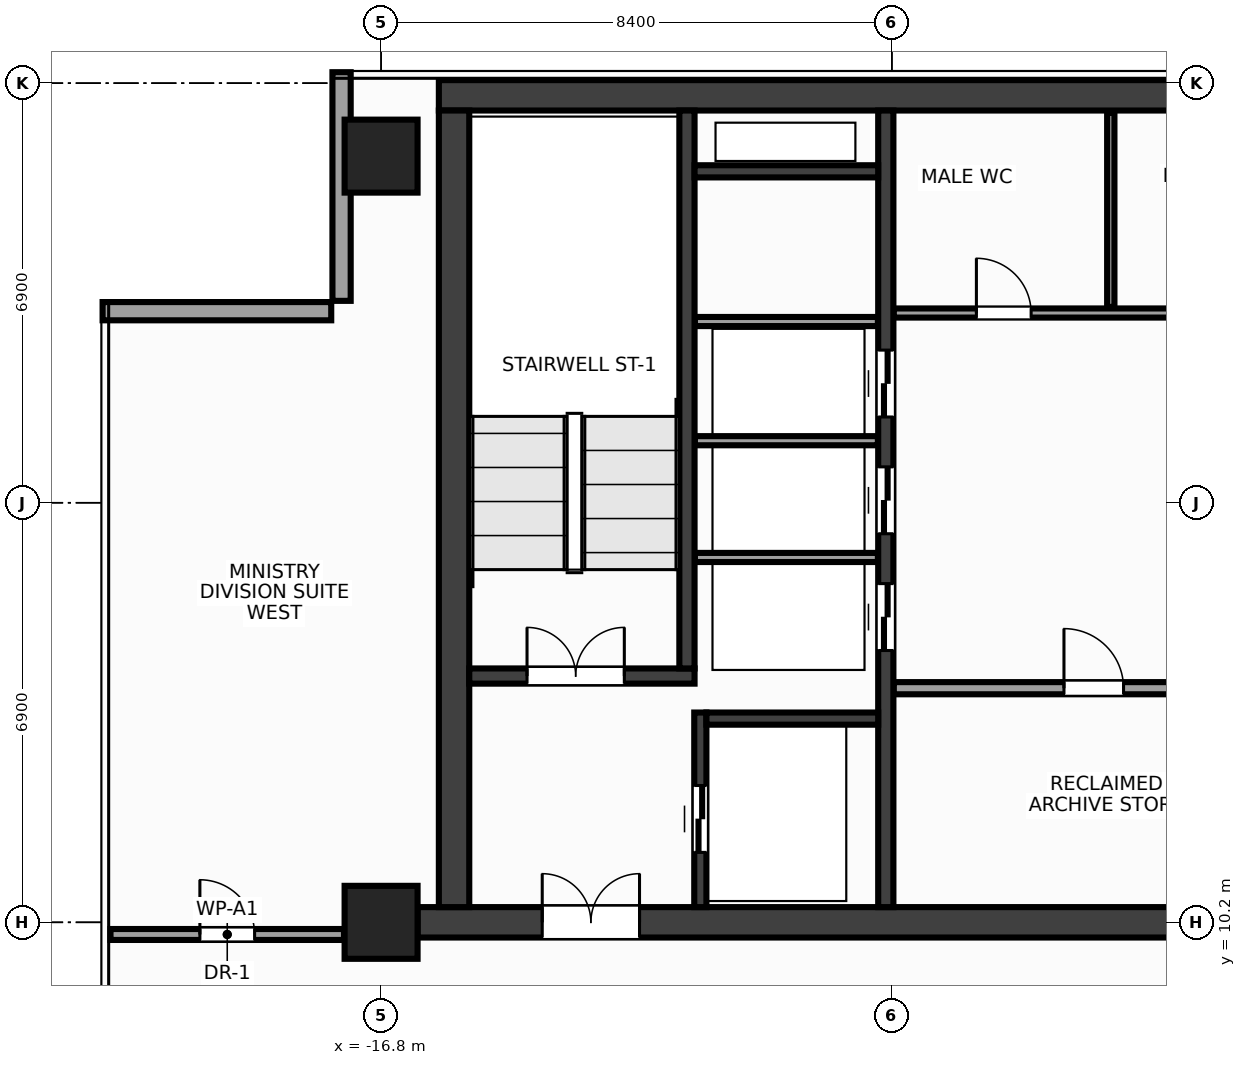
"""IFC4 building model, lengths in metres.
Left out: names, types, materials, properties, quantities, classifications, styles, units other than length and angle.
Written with IfcOpenShell. Run it as: python <this file> out.ifc"""

import sys

from ifc_helpers import new_model, si_unit, direction, frame, frame_2d, origin, origin_2d, place, context, subcontext, project, spatial, rectangle, extrude, source, transform, mapped, element, fill, save


model = new_model("IFC4")
c1 = context("Model", 3, precision=1e-05, world=origin(), true_north=direction((0.0, 1.0)))
c2 = subcontext(c1, "Body", "Model", "MODEL_VIEW")
j1 = project(units=[si_unit("LENGTHUNIT", "METRE"), si_unit("PLANEANGLEUNIT", "RADIAN")], contexts=[c1])
p1 = place(None, origin())
s1 = spatial("IfcSite", under=j1, at=p1, CompositionType="ELEMENT")
p2 = place(p1, origin())
s2 = spatial("IfcBuilding", under=s1, at=p2, CompositionType="ELEMENT")
p3 = place(p2, frame((0.0, 0.0, 290.0)))
s3 = spatial("IfcBuildingStorey", under=s2, at=p3, CompositionType="ELEMENT", Elevation=290.0)
m1 = source(origin(), c2, "Body", "SweptSolid", [
    extrude(rectangle(XDim=31.7, YDim=0.5, at=frame_2d((15.85, 0.0))), origin(), (0.0, 0.0, 1.0), 3.6),
])
p4 = place(p3, frame((-15.85, 23.8, 0.0), z_axis=(0.0, 0.0, 1.0), x_axis=(1.0, 0.0, 0.0)))
e1 = element("IfcWall", 1, at=p4, inside=s3, PredefinedType="SHEAR", context=c2, shape_type="MappedRepresentation", body=[
    mapped(m1, transform((0.0, 0.0, 0.0), x_axis=(1.0, 0.0, 0.0), y_axis=(0.0, 1.0, 0.0), z_axis=(0.0, 0.0, 1.0), scale=1.0)),
])
m2 = source(origin(), c2, "Body", "SweptSolid", [
    extrude(rectangle(XDim=32.4, YDim=0.5, at=frame_2d((16.2, 0.0))), origin(), (0.0, 0.0, 1.0), 3.6),
])
p5 = place(p3, frame((-16.2, 10.2, 0.0), z_axis=(0.0, 0.0, 1.0), x_axis=(1.0, 0.0, 0.0)))
e2 = element("IfcWall", 2, at=p5, inside=s3, PredefinedType="SHEAR", context=c2, shape_type="MappedRepresentation", body=[
    mapped(m2, transform((0.0, 0.0, 0.0), x_axis=(1.0, 0.0, 0.0), y_axis=(0.0, 1.0, 0.0), z_axis=(0.0, 0.0, 1.0), scale=1.0)),
])
p6 = place(p5, frame((2.05, 0.0, 0.0)))
e3 = element("IfcOpeningElement", 3, at=p6, cuts=e2, PredefinedType="OPENING", context=c2, shape_type="SweptSolid", body=[
    extrude(rectangle(XDim=1.6, YDim=2.15, at=frame_2d((0.8, 1.075))), frame((0.0, 0.262, 0.0), z_axis=(0.0, -1.0, 0.0), x_axis=(1.0, 0.0, 0.0)), (0.0, 0.0, 1.0), 0.524),
])
p7 = place(p5, frame((28.75, 0.0, 0.0)))
e4 = element("IfcOpeningElement", 4, at=p7, cuts=e2, PredefinedType="OPENING", context=c2, shape_type="SweptSolid", body=[
    extrude(rectangle(XDim=1.6, YDim=2.15, at=frame_2d((0.8, 1.075))), frame((0.0, 0.262, 0.0), z_axis=(0.0, -1.0, 0.0), x_axis=(1.0, 0.0, 0.0)), (0.0, 0.0, 1.0), 0.524),
])
p8 = place(p5, frame((15.45, 0.0, 0.0)))
e5 = element("IfcOpeningElement", 5, at=p8, cuts=e2, PredefinedType="OPENING", context=c2, shape_type="SweptSolid", body=[
    extrude(rectangle(XDim=1.5, YDim=2.2, at=frame_2d((0.75, 1.1))), frame((0.0, 0.262, 0.0), z_axis=(0.0, -1.0, 0.0), x_axis=(1.0, 0.0, 0.0)), (0.0, 0.0, 1.0), 0.524),
])
m3 = source(origin(), c2, "Body", "SweptSolid", [
    extrude(rectangle(XDim=13.1, YDim=0.5, at=frame_2d((6.55, 0.0))), origin(), (0.0, 0.0, 1.0), 3.6),
])
p9 = place(p3, frame((-15.6, 10.45, 0.0), z_axis=(0.0, 0.0, 1.0), x_axis=(0.0, 1.0, 0.0)))
e6 = element("IfcWall", 6, at=p9, inside=s3, PredefinedType="SHEAR", context=c2, shape_type="MappedRepresentation", body=[
    mapped(m3, transform((0.0, 0.0, 0.0), x_axis=(1.0, 0.0, 0.0), y_axis=(0.0, 1.0, 0.0), z_axis=(0.0, 0.0, 1.0), scale=1.0)),
])
m4 = source(origin(), c2, "Body", "SweptSolid", [
    extrude(rectangle(XDim=13.1, YDim=0.25, at=frame_2d((6.55, 0.0))), origin(), (0.0, 0.0, 1.0), 3.6),
])
p10 = place(p3, frame((-8.5, 10.45, 0.0), z_axis=(0.0, 0.0, 1.0), x_axis=(0.0, 1.0, 0.0)))
e7 = element("IfcWall", 7, at=p10, inside=s3, PredefinedType="SHEAR", context=c2, shape_type="MappedRepresentation", body=[
    mapped(m4, transform((0.0, 0.0, 0.0), x_axis=(1.0, 0.0, 0.0), y_axis=(0.0, 1.0, 0.0), z_axis=(0.0, 0.0, 1.0), scale=1.0)),
])
p11 = place(p10, frame((4.22, 0.0, 0.0)))
e8 = element("IfcOpeningElement", 8, at=p11, cuts=e7, PredefinedType="OPENING", context=c2, shape_type="SweptSolid", body=[
    extrude(rectangle(XDim=1.1, YDim=2.15, at=frame_2d((0.55, 1.075))), frame((0.0, 0.137, 0.0), z_axis=(0.0, -1.0, 0.0), x_axis=(1.0, 0.0, 0.0)), (0.0, 0.0, 1.0), 0.274),
])
p12 = place(p10, frame((6.14, 0.0, 0.0)))
e9 = element("IfcOpeningElement", 9, at=p12, cuts=e7, PredefinedType="OPENING", context=c2, shape_type="SweptSolid", body=[
    extrude(rectangle(XDim=1.1, YDim=2.15, at=frame_2d((0.55, 1.075))), frame((0.0, 0.137, 0.0), z_axis=(0.0, -1.0, 0.0), x_axis=(1.0, 0.0, 0.0)), (0.0, 0.0, 1.0), 0.274),
])
p13 = place(p10, frame((8.06, 0.0, 0.0)))
e10 = element("IfcOpeningElement", 10, at=p13, cuts=e7, PredefinedType="OPENING", context=c2, shape_type="SweptSolid", body=[
    extrude(rectangle(XDim=1.1, YDim=2.15, at=frame_2d((0.55, 1.075))), frame((0.0, 0.137, 0.0), z_axis=(0.0, -1.0, 0.0), x_axis=(1.0, 0.0, 0.0)), (0.0, 0.0, 1.0), 0.274),
])
m5 = source(origin(), c2, "Body", "SweptSolid", [
    extrude(rectangle(XDim=3.705, YDim=0.25, at=frame_2d((1.853, 0.0))), origin(), (0.0, 0.0, 1.0), 3.6),
])
p14 = place(p3, frame((-15.35, 14.25, 0.0), z_axis=(0.0, 0.0, 1.0), x_axis=(1.0, 0.0, 0.0)))
e11 = element("IfcWall", 11, at=p14, inside=s3, PredefinedType="SHEAR", context=c2, shape_type="MappedRepresentation", body=[
    mapped(m5, transform((0.0, 0.0, 0.0), x_axis=(1.0, 0.0, 0.0), y_axis=(0.0, 1.0, 0.0), z_axis=(0.0, 0.0, 1.0), scale=1.0)),
])
p15 = place(p14, frame((0.95, 0.0, 0.0)))
e12 = element("IfcOpeningElement", 12, at=p15, cuts=e11, PredefinedType="OPENING", context=c2, shape_type="SweptSolid", body=[
    extrude(rectangle(XDim=1.6, YDim=2.15, at=frame_2d((0.8, 1.075))), frame((0.0, 0.137, 0.0), z_axis=(0.0, -1.0, 0.0), x_axis=(1.0, 0.0, 0.0)), (0.0, 0.0, 1.0), 0.274),
])
m6 = source(origin(), c2, "Body", "SweptSolid", [
    extrude(rectangle(XDim=9.175, YDim=0.25, at=frame_2d((4.587, 0.0))), origin(), (0.0, 0.0, 1.0), 3.6),
])
p16 = place(p3, frame((-11.77, 14.375, 0.0), z_axis=(0.0, 0.0, 1.0), x_axis=(0.0, 1.0, 0.0)))
e13 = element("IfcWall", 13, at=p16, inside=s3, PredefinedType="SHEAR", context=c2, shape_type="MappedRepresentation", body=[
    mapped(m6, transform((0.0, 0.0, 0.0), x_axis=(1.0, 0.0, 0.0), y_axis=(0.0, 1.0, 0.0), z_axis=(0.0, 0.0, 1.0), scale=1.0)),
])
m7 = source(origin(), c2, "Body", "SweptSolid", [
    extrude(rectangle(XDim=3.2, YDim=0.2, at=frame_2d((1.6, 0.0))), origin(), (0.0, 0.0, 1.0), 3.6),
])
p17 = place(p3, frame((-11.55, 10.45, 0.0), z_axis=(0.0, 0.0, 1.0), x_axis=(0.0, 1.0, 0.0)))
e14 = element("IfcWall", 14, at=p17, inside=s3, PredefinedType="SHEAR", context=c2, shape_type="MappedRepresentation", body=[
    mapped(m7, transform((0.0, 0.0, 0.0), x_axis=(1.0, 0.0, 0.0), y_axis=(0.0, 1.0, 0.0), z_axis=(0.0, 0.0, 1.0), scale=1.0)),
])
p18 = place(p17, frame((0.9, 0.0, 0.0)))
e15 = element("IfcOpeningElement", 15, at=p18, cuts=e14, PredefinedType="OPENING", context=c2, shape_type="SweptSolid", body=[
    extrude(rectangle(XDim=1.1, YDim=2.15, at=frame_2d((0.55, 1.075))), frame((0.0, 0.112, 0.0), z_axis=(0.0, -1.0, 0.0), x_axis=(1.0, 0.0, 0.0)), (0.0, 0.0, 1.0), 0.224),
])
m8 = source(origin(), c2, "Body", "SweptSolid", [
    extrude(rectangle(XDim=2.825, YDim=0.2, at=frame_2d((1.413, 0.0))), origin(), (0.0, 0.0, 1.0), 3.6),
])
p19 = place(p3, frame((-11.45, 13.55, 0.0), z_axis=(0.0, 0.0, 1.0), x_axis=(1.0, 0.0, 0.0)))
e16 = element("IfcWall", 16, at=p19, inside=s3, PredefinedType="SHEAR", context=c2, shape_type="MappedRepresentation", body=[
    mapped(m8, transform((0.0, 0.0, 0.0), x_axis=(1.0, 0.0, 0.0), y_axis=(0.0, 1.0, 0.0), z_axis=(0.0, 0.0, 1.0), scale=1.0)),
])
m9 = source(origin(), c2, "Body", "SweptSolid", [
    extrude(rectangle(XDim=3.02, YDim=0.2, at=frame_2d((1.51, 0.0))), origin(), (0.0, 0.0, 1.0), 3.6),
])
p20 = place(p3, frame((-11.645, 22.55, 0.0), z_axis=(0.0, 0.0, 1.0), x_axis=(1.0, 0.0, 0.0)))
e17 = element("IfcWall", 17, at=p20, inside=s3, PredefinedType="SHEAR", context=c2, shape_type="MappedRepresentation", body=[
    mapped(m9, transform((0.0, 0.0, 0.0), x_axis=(1.0, 0.0, 0.0), y_axis=(0.0, 1.0, 0.0), z_axis=(0.0, 0.0, 1.0), scale=1.0)),
])
m10 = source(origin(), c2, "Body", "SweptSolid", [
    extrude(rectangle(XDim=1.2, YDim=1.2, at=origin_2d()), origin(), (0.0, 0.0, 1.0), 3.6),
])
for number, where, z_axis, x_axis in (
    (18, (-16.8, 10.2, 0.0), (0.0, 0.0, 1.0), (1.0, 0.0, 0.0)),
    (19, (-16.8, 22.8, 0.0), (0.0, 0.0, 1.0), (1.0, 0.0, 0.0)),
):
    element("IfcColumn", number, at=place(p3, frame(where, z_axis=z_axis, x_axis=x_axis)), inside=s3, PredefinedType="COLUMN", context=c2, shape_type="MappedRepresentation", body=[
        mapped(m10, transform((0.0, 0.0, 0.0), x_axis=(1.0, 0.0, 0.0), y_axis=(0.0, 1.0, 0.0), z_axis=(0.0, 0.0, 1.0), scale=1.0)),
    ])
m11 = source(origin(), c2, "Body", "SweptSolid", [
    extrude(rectangle(XDim=3.76, YDim=0.3, at=frame_2d((1.88, 0.0))), origin(), (0.0, 0.0, 1.0), 3.6),
])
p21 = place(p3, frame((-17.45, 24.18, 0.0), z_axis=(0.0, 0.0, 1.0), x_axis=(0.0, -1.0, 0.0)))
e20 = element("IfcWall", 20, at=p21, inside=s3, PredefinedType="STANDARD", context=c2, shape_type="MappedRepresentation", body=[
    mapped(m11, transform((0.0, 0.0, 0.0), x_axis=(1.0, 0.0, 0.0), y_axis=(0.0, 1.0, 0.0), z_axis=(0.0, 0.0, 1.0), scale=1.0)),
])
m12 = source(origin(), c2, "Body", "SweptSolid", [
    extrude(rectangle(XDim=3.76, YDim=0.3, at=frame_2d((1.88, 0.0))), origin(), (0.0, 0.0, 1.0), 3.6),
])
p22 = place(p3, frame((-17.62, 20.25, 0.0), z_axis=(0.0, 0.0, 1.0), x_axis=(-1.0, 0.0, 0.0)))
e21 = element("IfcWall", 21, at=p22, inside=s3, PredefinedType="STANDARD", context=c2, shape_type="MappedRepresentation", body=[
    mapped(m12, transform((0.0, 0.0, 0.0), x_axis=(1.0, 0.0, 0.0), y_axis=(0.0, 1.0, 0.0), z_axis=(0.0, 0.0, 1.0), scale=1.0)),
])
m13 = source(origin(), c2, "Body", "SweptSolid", [
    extrude(rectangle(XDim=3.01, YDim=0.15, at=frame_2d((1.505, 0.0))), origin(), (0.0, 0.0, 1.0), 3.3),
])
for number, where, z_axis, x_axis in (
    (22, (-11.64, 16.2, 0.0), (0.0, 0.0, 1.0), (1.0, 0.0, 0.0)),
    (23, (-11.64, 18.12, 0.0), (0.0, 0.0, 1.0), (1.0, 0.0, 0.0)),
    (24, (-11.64, 20.08, 0.0), (0.0, 0.0, 1.0), (1.0, 0.0, 0.0)),
):
    element("IfcWall", number, at=place(p3, frame(where, z_axis=z_axis, x_axis=x_axis)), inside=s3, PredefinedType="PARTITIONING", context=c2, shape_type="MappedRepresentation", body=[
        mapped(m13, transform((0.0, 0.0, 0.0), x_axis=(1.0, 0.0, 0.0), y_axis=(0.0, 1.0, 0.0), z_axis=(0.0, 0.0, 1.0), scale=1.0)),
    ])
m14 = source(origin(), c2, "Body", "SweptSolid", [
    extrude(rectangle(XDim=7.07, YDim=0.2, at=frame_2d((3.535, 0.0))), origin(), (0.0, 0.0, 1.0), 3.3),
])
p23 = place(p3, frame((-8.37, 14.05, 0.0), z_axis=(0.0, 0.0, 1.0), x_axis=(1.0, 0.0, 0.0)))
e25 = element("IfcWall", 25, at=p23, inside=s3, PredefinedType="PARTITIONING", context=c2, shape_type="MappedRepresentation", body=[
    mapped(m14, transform((0.0, 0.0, 0.0), x_axis=(1.0, 0.0, 0.0), y_axis=(0.0, 1.0, 0.0), z_axis=(0.0, 0.0, 1.0), scale=1.0)),
])
p24 = place(p23, frame((2.8, 0.0, 0.0)))
e26 = element("IfcOpeningElement", 26, at=p24, cuts=e25, PredefinedType="OPENING", context=c2, shape_type="SweptSolid", body=[
    extrude(rectangle(XDim=0.98, YDim=2.15, at=frame_2d((0.49, 1.075))), frame((0.0, 0.112, 0.0), z_axis=(0.0, -1.0, 0.0), x_axis=(1.0, 0.0, 0.0)), (0.0, 0.0, 1.0), 0.224),
])
m15 = source(origin(), c2, "Body", "SweptSolid", [
    extrude(rectangle(XDim=14.59, YDim=0.15, at=frame_2d((7.295, 0.0))), origin(), (0.0, 0.0, 1.0), 3.3),
])
p25 = place(p3, frame((-8.37, 20.22, 0.0), z_axis=(0.0, 0.0, 1.0), x_axis=(1.0, 0.0, 0.0)))
e27 = element("IfcWall", 27, at=p25, inside=s3, PredefinedType="PARTITIONING", context=c2, shape_type="MappedRepresentation", body=[
    mapped(m15, transform((0.0, 0.0, 0.0), x_axis=(1.0, 0.0, 0.0), y_axis=(0.0, 1.0, 0.0), z_axis=(0.0, 0.0, 1.0), scale=1.0)),
])
p26 = place(p25, frame((1.36, 0.0, 0.0)))
e28 = element("IfcOpeningElement", 28, at=p26, cuts=e27, PredefinedType="OPENING", context=c2, shape_type="SweptSolid", body=[
    extrude(rectangle(XDim=0.9, YDim=2.15, at=frame_2d((0.45, 1.075))), frame((0.0, 0.087, 0.0), z_axis=(0.0, -1.0, 0.0), x_axis=(1.0, 0.0, 0.0)), (0.0, 0.0, 1.0), 0.174),
])
p27 = place(p25, frame((4.92, 0.0, 0.0)))
e29 = element("IfcOpeningElement", 29, at=p27, cuts=e27, PredefinedType="OPENING", context=c2, shape_type="SweptSolid", body=[
    extrude(rectangle(XDim=0.9, YDim=2.15, at=frame_2d((0.45, 1.075))), frame((0.0, 0.087, 0.0), z_axis=(0.0, -1.0, 0.0), x_axis=(1.0, 0.0, 0.0)), (0.0, 0.0, 1.0), 0.174),
])
p28 = place(p25, frame((10.37, 0.0, 0.0)))
e30 = element("IfcOpeningElement", 30, at=p28, cuts=e27, PredefinedType="OPENING", context=c2, shape_type="SweptSolid", body=[
    extrude(rectangle(XDim=0.9, YDim=2.15, at=frame_2d((0.45, 1.075))), frame((0.0, 0.087, 0.0), z_axis=(0.0, -1.0, 0.0), x_axis=(1.0, 0.0, 0.0)), (0.0, 0.0, 1.0), 0.174),
])
m16 = source(origin(), c2, "Body", "SweptSolid", [
    extrude(rectangle(XDim=3.19, YDim=0.12, at=frame_2d((1.595, 0.0))), origin(), (0.0, 0.0, 1.0), 3.3),
])
p29 = place(p3, frame((-4.8, 20.32, 0.0), z_axis=(0.0, 0.0, 1.0), x_axis=(0.0, 1.0, 0.0)))
e31 = element("IfcWall", 31, at=p29, inside=s3, PredefinedType="PARTITIONING", context=c2, shape_type="MappedRepresentation", body=[
    mapped(m16, transform((0.0, 0.0, 0.0), x_axis=(1.0, 0.0, 0.0), y_axis=(0.0, 1.0, 0.0), z_axis=(0.0, 0.0, 1.0), scale=1.0)),
])
m17 = source(origin(), c2, "Body", "SweptSolid", [
    extrude(rectangle(XDim=3.84, YDim=0.18, at=frame_2d((1.92, 0.0))), origin(), (0.0, 0.0, 1.0), 2.735),
])
p30 = place(p3, frame((-21.25, 10.0, 0.0), z_axis=(0.0, 0.0, 1.0), x_axis=(1.0, 0.0, 0.0)))
e32 = element("IfcWall", 32, at=p30, inside=s3, PredefinedType="PARTITIONING", context=c2, shape_type="MappedRepresentation", body=[
    mapped(m17, transform((0.0, 0.0, 0.0), x_axis=(1.0, 0.0, 0.0), y_axis=(0.0, 1.0, 0.0), z_axis=(0.0, 0.0, 1.0), scale=1.0)),
])
p31 = place(p30, frame((1.47, 0.0, 0.0)))
e33 = element("IfcOpeningElement", 33, at=p31, cuts=e32, PredefinedType="OPENING", context=c2, shape_type="SweptSolid", body=[
    extrude(rectangle(XDim=0.9, YDim=2.15, at=frame_2d((0.45, 1.075))), frame((0.0, 0.102, 0.0), z_axis=(0.0, -1.0, 0.0), x_axis=(1.0, 0.0, 0.0)), (0.0, 0.0, 1.0), 0.204),
])
m18 = source(origin(), c2, "Body", "SweptSolid", [
    extrude(rectangle(XDim=1.6, YDim=2.15, at=frame_2d((0.8, 1.075))), frame((0.0, 0.025, 0.0), z_axis=(0.0, -1.0, 0.0), x_axis=(1.0, 0.0, 0.0)), (0.0, 0.0, 1.0), 0.05),
])
p32 = place(p15, origin())
e34 = element("IfcDoor", 34, at=p32, inside=s3, OperationType="DOUBLE_DOOR_SINGLE_SWING", PredefinedType="DOOR", context=c2, shape_type="MappedRepresentation", body=[
    mapped(m18, transform((0.0, 0.0, 0.0), x_axis=(1.0, 0.0, 0.0), y_axis=(0.0, 1.0, 0.0), z_axis=(0.0, 0.0, 1.0), scale=1.0)),
])
fill(e12, e34)
p33 = place(p6, origin())
e35 = element("IfcDoor", 35, at=p33, inside=s3, OperationType="DOUBLE_DOOR_SINGLE_SWING", PredefinedType="DOOR", context=c2, shape_type="MappedRepresentation", body=[
    mapped(m18, transform((0.0, 0.0, 0.0), x_axis=(1.0, 0.0, 0.0), y_axis=(0.0, 1.0, 0.0), z_axis=(0.0, 0.0, 1.0), scale=1.0)),
])
fill(e3, e35)
m19 = source(origin(), c2, "Body", "SweptSolid", [
    extrude(rectangle(XDim=1.1, YDim=2.15, at=frame_2d((0.55, 1.075))), frame((0.0, 0.025, 0.0), z_axis=(0.0, -1.0, 0.0), x_axis=(1.0, 0.0, 0.0)), (0.0, 0.0, 1.0), 0.05),
])
p34 = place(p18, origin())
e36 = element("IfcDoor", 36, at=p34, inside=s3, OperationType="DOUBLE_DOOR_SLIDING", PredefinedType="DOOR", context=c2, shape_type="MappedRepresentation", body=[
    mapped(m19, transform((0.0, 0.0, 0.0), x_axis=(1.0, 0.0, 0.0), y_axis=(0.0, 1.0, 0.0), z_axis=(0.0, 0.0, 1.0), scale=1.0)),
])
fill(e15, e36)
p35 = place(p11, origin())
e37 = element("IfcDoor", 37, at=p35, inside=s3, OperationType="DOUBLE_DOOR_SLIDING", PredefinedType="DOOR", context=c2, shape_type="MappedRepresentation", body=[
    mapped(m19, transform((0.0, 0.0, 0.0), x_axis=(1.0, 0.0, 0.0), y_axis=(0.0, 1.0, 0.0), z_axis=(0.0, 0.0, 1.0), scale=1.0)),
])
fill(e8, e37)
p36 = place(p12, origin())
e38 = element("IfcDoor", 38, at=p36, inside=s3, OperationType="DOUBLE_DOOR_SLIDING", PredefinedType="DOOR", context=c2, shape_type="MappedRepresentation", body=[
    mapped(m19, transform((0.0, 0.0, 0.0), x_axis=(1.0, 0.0, 0.0), y_axis=(0.0, 1.0, 0.0), z_axis=(0.0, 0.0, 1.0), scale=1.0)),
])
fill(e9, e38)
p37 = place(p13, origin())
e39 = element("IfcDoor", 39, at=p37, inside=s3, OperationType="DOUBLE_DOOR_SLIDING", PredefinedType="DOOR", context=c2, shape_type="MappedRepresentation", body=[
    mapped(m19, transform((0.0, 0.0, 0.0), x_axis=(1.0, 0.0, 0.0), y_axis=(0.0, 1.0, 0.0), z_axis=(0.0, 0.0, 1.0), scale=1.0)),
])
fill(e10, e39)
m20 = source(origin(), c2, "Body", "SweptSolid", [
    extrude(rectangle(XDim=0.98, YDim=2.15, at=frame_2d((0.49, 1.075))), frame((0.0, 0.025, 0.0), z_axis=(0.0, -1.0, 0.0), x_axis=(1.0, 0.0, 0.0)), (0.0, 0.0, 1.0), 0.05),
])
p38 = place(p24, origin())
e40 = element("IfcDoor", 40, at=p38, inside=s3, OperationType="SINGLE_SWING_LEFT", PredefinedType="DOOR", context=c2, shape_type="MappedRepresentation", body=[
    mapped(m20, transform((0.0, 0.0, 0.0), x_axis=(1.0, 0.0, 0.0), y_axis=(0.0, 1.0, 0.0), z_axis=(0.0, 0.0, 1.0), scale=1.0)),
])
fill(e26, e40)
m21 = source(origin(), c2, "Body", "SweptSolid", [
    extrude(rectangle(XDim=0.9, YDim=2.15, at=frame_2d((0.45, 1.075))), frame((0.0, 0.025, 0.0), z_axis=(0.0, -1.0, 0.0), x_axis=(1.0, 0.0, 0.0)), (0.0, 0.0, 1.0), 0.05),
])
p39 = place(p26, origin())
e41 = element("IfcDoor", 41, at=p39, inside=s3, OperationType="SINGLE_SWING_LEFT", PredefinedType="DOOR", context=c2, shape_type="MappedRepresentation", body=[
    mapped(m21, transform((0.0, 0.0, 0.0), x_axis=(1.0, 0.0, 0.0), y_axis=(0.0, 1.0, 0.0), z_axis=(0.0, 0.0, 1.0), scale=1.0)),
])
fill(e28, e41)
p40 = place(p31, origin())
e42 = element("IfcDoor", 42, at=p40, inside=s3, OperationType="SINGLE_SWING_LEFT", PredefinedType="DOOR", context=c2, shape_type="MappedRepresentation", body=[
    mapped(m21, transform((0.0, 0.0, 0.0), x_axis=(1.0, 0.0, 0.0), y_axis=(0.0, 1.0, 0.0), z_axis=(0.0, 0.0, 1.0), scale=1.0)),
])
fill(e33, e42)
save(model, sys.argv[1])
